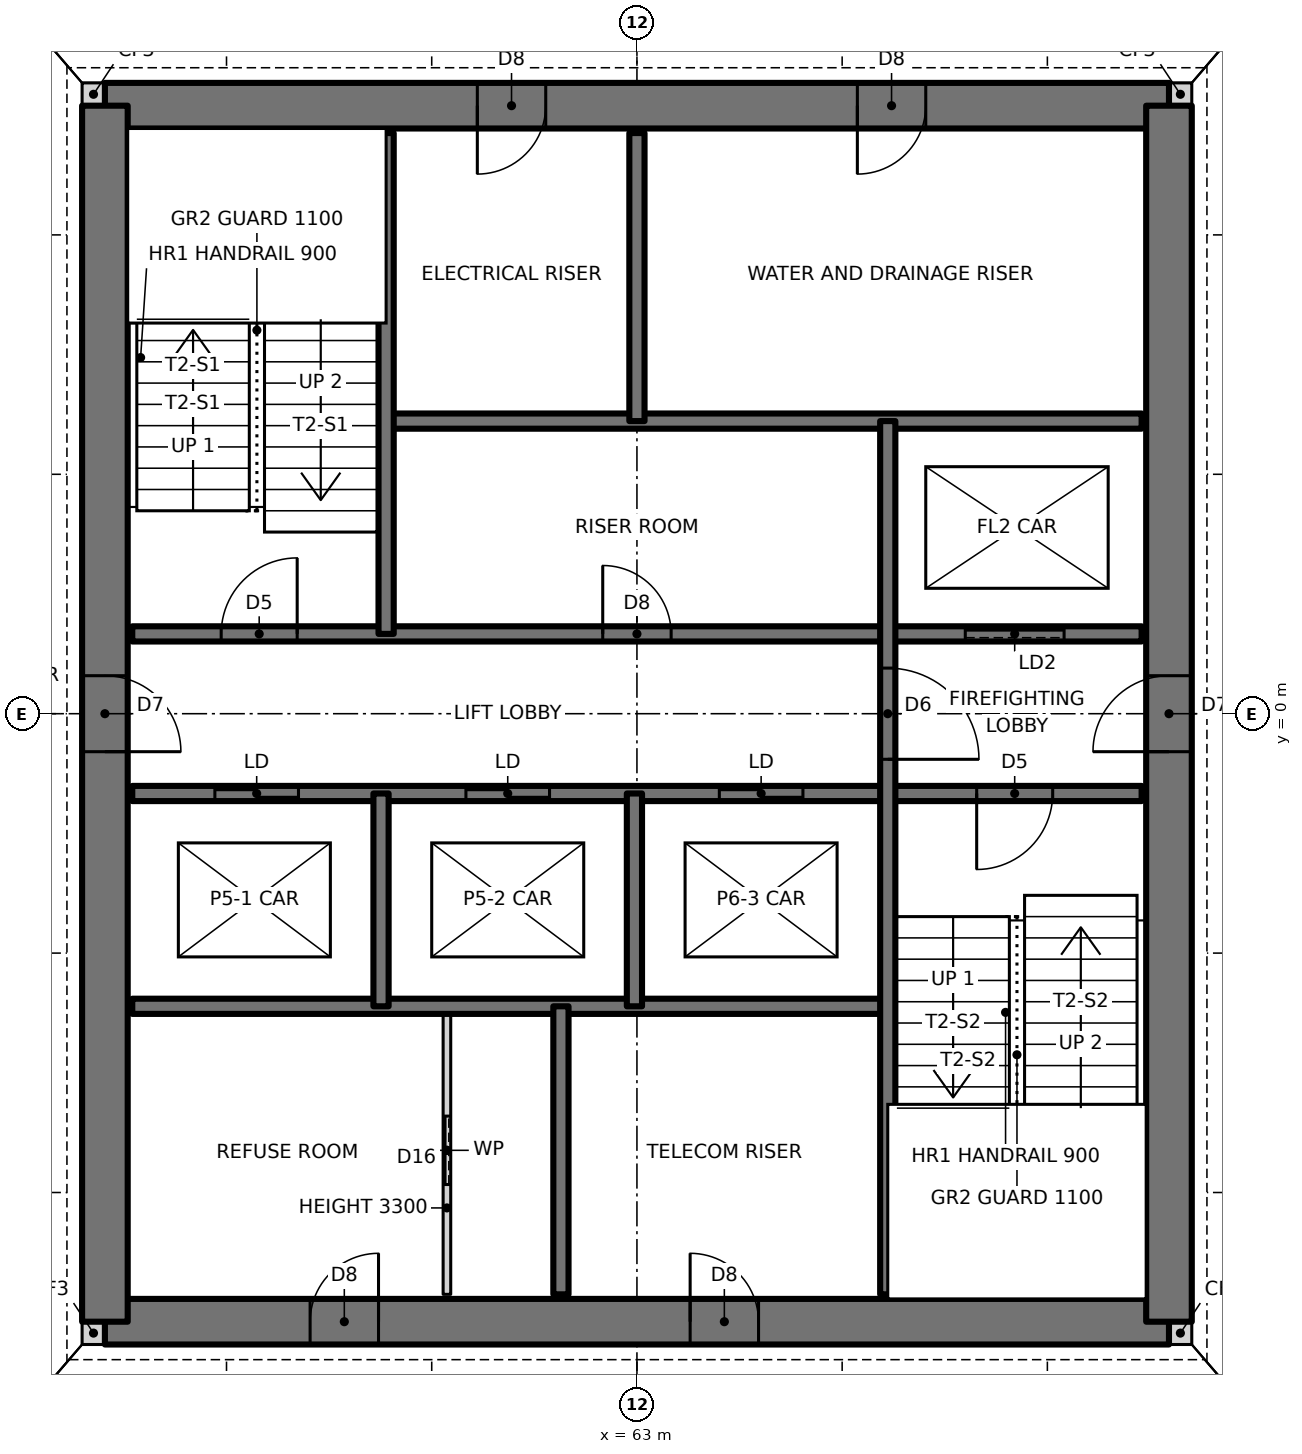
"""IFC4 building model, lengths in metres.
Left out: names, types, materials, properties, quantities, classifications, styles, units other than length and angle.
Written with IfcOpenShell. Run it as: python <this file> out.ifc"""

import sys

from ifc_helpers import new_model, si_unit, direction, frame, frame_2d, origin, place, context, subcontext, project, spatial, rectangle, extrude, element, fill, save


model = new_model("IFC4")
c1 = context("Model", 3, precision=1e-05, world=origin(), true_north=direction((0.0, 1.0)))
c2 = subcontext(c1, "Body", "Model", "MODEL_VIEW")
j1 = project(units=[si_unit("LENGTHUNIT", "METRE"), si_unit("PLANEANGLEUNIT", "RADIAN")], contexts=[c1])
p1 = place(None, origin())
s1 = spatial("IfcSite", under=j1, at=p1, CompositionType="ELEMENT")
p2 = place(p1, origin())
s2 = spatial("IfcBuilding", under=s1, at=p2, CompositionType="ELEMENT")
p3 = place(p2, frame((0.0, 0.0, 67.5)))
s3 = spatial("IfcBuildingStorey", under=s2, at=p3, CompositionType="ELEMENT", Elevation=67.5)
for number, where, z_axis, x_axis in (
    (1, (55.7, -8.15, 0.0), (0.0, 0.0, 1.0), (1.0, 0.0, 0.0)),
    (2, (70.0, -8.15, 0.0), (0.0, 0.0, 1.0), (1.0, 0.0, 0.0)),
    (3, (70.0, 8.15, 0.0), (0.0, 0.0, 1.0), (1.0, 0.0, 0.0)),
    (4, (55.7, 8.15, 0.0), (0.0, 0.0, 1.0), (1.0, 0.0, 0.0)),
):
    element("IfcWall", number, at=place(p3, frame(where, z_axis=z_axis, x_axis=x_axis)), inside=s3, PredefinedType="SOLIDWALL", context=c2, shape_type="SweptSolid", body=[
        extrude(rectangle(XDim=0.3, YDim=0.3, at=frame_2d((0.15, 0.0))), origin(), (0.0, 0.0, 1.0), 3.5),
    ])
p4 = place(p3, frame((56.0, -8.0, 0.0), z_axis=(0.0, 0.0, 1.0), x_axis=(1.0, 0.0, 0.0)))
e5 = element("IfcWall", 5, at=p4, inside=s3, PredefinedType="SHEAR", context=c2, shape_type="SweptSolid", body=[
    extrude(rectangle(XDim=14.0, YDim=0.6, at=frame_2d((7.0, 0.0))), origin(), (0.0, 0.0, 1.0), 3.5),
])
p5 = place(p4, frame((2.7, 0.0, 0.0)))
e6 = element("IfcOpeningElement", 6, at=p5, cuts=e5, PredefinedType="OPENING", context=c2, shape_type="SweptSolid", body=[
    extrude(rectangle(XDim=0.9, YDim=2.1, at=frame_2d((0.45, 1.05))), frame((0.0, 0.31, 0.0), z_axis=(0.0, -1.0, 0.0), x_axis=(1.0, 0.0, 0.0)), (0.0, 0.0, 1.0), 0.62),
])
p6 = place(p4, frame((7.7, 0.0, 0.0)))
e7 = element("IfcOpeningElement", 7, at=p6, cuts=e5, PredefinedType="OPENING", context=c2, shape_type="SweptSolid", body=[
    extrude(rectangle(XDim=0.9, YDim=2.1, at=frame_2d((0.45, 1.05))), frame((0.0, 0.31, 0.0), z_axis=(0.0, -1.0, 0.0), x_axis=(1.0, 0.0, 0.0)), (0.0, 0.0, 1.0), 0.62),
])
p7 = place(p3, frame((70.0, 8.0, 0.0), z_axis=(0.0, 0.0, 1.0), x_axis=(-1.0, 0.0, 0.0)))
e8 = element("IfcWall", 8, at=p7, inside=s3, PredefinedType="SHEAR", context=c2, shape_type="SweptSolid", body=[
    extrude(rectangle(XDim=14.0, YDim=0.6, at=frame_2d((7.0, 0.0))), origin(), (0.0, 0.0, 1.0), 3.5),
])
p8 = place(p7, frame((8.2, 0.0, 0.0)))
e9 = element("IfcOpeningElement", 9, at=p8, cuts=e8, PredefinedType="OPENING", context=c2, shape_type="SweptSolid", body=[
    extrude(rectangle(XDim=0.9, YDim=2.1, at=frame_2d((0.45, 1.05))), frame((0.0, 0.31, 0.0), z_axis=(0.0, -1.0, 0.0), x_axis=(1.0, 0.0, 0.0)), (0.0, 0.0, 1.0), 0.62),
])
p9 = place(p7, frame((3.2, 0.0, 0.0)))
e10 = element("IfcOpeningElement", 10, at=p9, cuts=e8, PredefinedType="OPENING", context=c2, shape_type="SweptSolid", body=[
    extrude(rectangle(XDim=0.9, YDim=2.1, at=frame_2d((0.45, 1.05))), frame((0.0, 0.31, 0.0), z_axis=(0.0, -1.0, 0.0), x_axis=(1.0, 0.0, 0.0)), (0.0, 0.0, 1.0), 0.62),
])
p10 = place(p3, frame((70.0, -8.0, 0.0), z_axis=(0.0, 0.0, 1.0), x_axis=(0.0, 1.0, 0.0)))
e11 = element("IfcWall", 11, at=p10, inside=s3, PredefinedType="SHEAR", context=c2, shape_type="SweptSolid", body=[
    extrude(rectangle(XDim=16.0, YDim=0.6, at=frame_2d((8.0, 0.0))), origin(), (0.0, 0.0, 1.0), 3.5),
])
p11 = place(p10, frame((7.5, 0.0, 0.0)))
e12 = element("IfcOpeningElement", 12, at=p11, cuts=e11, PredefinedType="OPENING", context=c2, shape_type="SweptSolid", body=[
    extrude(rectangle(XDim=1.0, YDim=2.1, at=frame_2d((0.5, 1.05))), frame((0.0, 0.31, 0.0), z_axis=(0.0, -1.0, 0.0), x_axis=(1.0, 0.0, 0.0)), (0.0, 0.0, 1.0), 0.62),
])
p12 = place(p3, frame((56.0, 8.0, 0.0), z_axis=(0.0, 0.0, 1.0), x_axis=(0.0, -1.0, 0.0)))
e13 = element("IfcWall", 13, at=p12, inside=s3, PredefinedType="SHEAR", context=c2, shape_type="SweptSolid", body=[
    extrude(rectangle(XDim=16.0, YDim=0.6, at=frame_2d((8.0, 0.0))), origin(), (0.0, 0.0, 1.0), 3.5),
])
p13 = place(p12, frame((7.5, 0.0, 0.0)))
e14 = element("IfcOpeningElement", 14, at=p13, cuts=e13, PredefinedType="OPENING", context=c2, shape_type="SweptSolid", body=[
    extrude(rectangle(XDim=1.0, YDim=2.1, at=frame_2d((0.5, 1.05))), frame((0.0, 0.31, 0.0), z_axis=(0.0, -1.0, 0.0), x_axis=(1.0, 0.0, 0.0)), (0.0, 0.0, 1.0), 0.62),
])
p14 = place(p3, frame((56.36, -3.85, 0.0), z_axis=(0.0, 0.0, 1.0), x_axis=(1.0, 0.0, 0.0)))
e15 = element("IfcWall", 15, at=p14, inside=s3, PredefinedType="SOLIDWALL", context=c2, shape_type="SweptSolid", body=[
    extrude(rectangle(XDim=9.94, YDim=0.2, at=frame_2d((4.97, 0.0))), origin(), (0.0, 0.0, 1.0), 3.5),
])
p15 = place(p3, frame((56.36, -1.05, 0.0), z_axis=(0.0, 0.0, 1.0), x_axis=(1.0, 0.0, 0.0)))
e16 = element("IfcWall", 16, at=p15, inside=s3, PredefinedType="SOLIDWALL", context=c2, shape_type="SweptSolid", body=[
    extrude(rectangle(XDim=13.28, YDim=0.2, at=frame_2d((6.64, 0.0))), origin(), (0.0, 0.0, 1.0), 3.5),
])
p16 = place(p15, frame((11.11, 0.0, 0.0)))
e17 = element("IfcOpeningElement", 17, at=p16, cuts=e16, PredefinedType="OPENING", context=c2, shape_type="SweptSolid", body=[
    extrude(rectangle(XDim=1.0, YDim=2.1, at=frame_2d((0.5, 1.05))), frame((0.0, 0.11, 0.0), z_axis=(0.0, -1.0, 0.0), x_axis=(1.0, 0.0, 0.0)), (0.0, 0.0, 1.0), 0.22),
])
p17 = place(p15, frame((1.087, 0.0, 0.0)))
e18 = element("IfcOpeningElement", 18, at=p17, cuts=e16, PredefinedType="OPENING", context=c2, shape_type="SweptSolid", body=[
    extrude(rectangle(XDim=1.1, YDim=2.1, at=frame_2d((0.55, 1.05))), frame((0.0, 0.11, 0.0), z_axis=(0.0, -1.0, 0.0), x_axis=(1.0, 0.0, 0.0)), (0.0, 0.0, 1.0), 0.22),
])
p18 = place(p15, frame((4.39, 0.0, 0.0)))
e19 = element("IfcOpeningElement", 19, at=p18, cuts=e16, PredefinedType="OPENING", context=c2, shape_type="SweptSolid", body=[
    extrude(rectangle(XDim=1.1, YDim=2.1, at=frame_2d((0.55, 1.05))), frame((0.0, 0.11, 0.0), z_axis=(0.0, -1.0, 0.0), x_axis=(1.0, 0.0, 0.0)), (0.0, 0.0, 1.0), 0.22),
])
p19 = place(p15, frame((7.724, 0.0, 0.0)))
e20 = element("IfcOpeningElement", 20, at=p19, cuts=e16, PredefinedType="OPENING", context=c2, shape_type="SweptSolid", body=[
    extrude(rectangle(XDim=1.1, YDim=2.1, at=frame_2d((0.55, 1.05))), frame((0.0, 0.11, 0.0), z_axis=(0.0, -1.0, 0.0), x_axis=(1.0, 0.0, 0.0)), (0.0, 0.0, 1.0), 0.22),
])
p20 = place(p3, frame((56.36, 1.05, 0.0), z_axis=(0.0, 0.0, 1.0), x_axis=(1.0, 0.0, 0.0)))
e21 = element("IfcWall", 21, at=p20, inside=s3, PredefinedType="SOLIDWALL", context=c2, shape_type="SweptSolid", body=[
    extrude(rectangle(XDim=13.28, YDim=0.2, at=frame_2d((6.64, 0.0))), origin(), (0.0, 0.0, 1.0), 3.5),
])
p21 = place(p20, frame((1.17, 0.0, 0.0)))
e22 = element("IfcOpeningElement", 22, at=p21, cuts=e21, PredefinedType="OPENING", context=c2, shape_type="SweptSolid", body=[
    extrude(rectangle(XDim=1.0, YDim=2.1, at=frame_2d((0.5, 1.05))), frame((0.0, 0.11, 0.0), z_axis=(0.0, -1.0, 0.0), x_axis=(1.0, 0.0, 0.0)), (0.0, 0.0, 1.0), 0.22),
])
p22 = place(p20, frame((6.19, 0.0, 0.0)))
e23 = element("IfcOpeningElement", 23, at=p22, cuts=e21, PredefinedType="OPENING", context=c2, shape_type="SweptSolid", body=[
    extrude(rectangle(XDim=0.9, YDim=2.1, at=frame_2d((0.45, 1.05))), frame((0.0, 0.11, 0.0), z_axis=(0.0, -1.0, 0.0), x_axis=(1.0, 0.0, 0.0)), (0.0, 0.0, 1.0), 0.22),
])
p23 = place(p20, frame((10.96, 0.0, 0.0)))
e24 = element("IfcOpeningElement", 24, at=p23, cuts=e21, PredefinedType="OPENING", context=c2, shape_type="SweptSolid", body=[
    extrude(rectangle(XDim=1.3, YDim=2.1, at=frame_2d((0.65, 1.05))), frame((0.0, 0.11, 0.0), z_axis=(0.0, -1.0, 0.0), x_axis=(1.0, 0.0, 0.0)), (0.0, 0.0, 1.0), 0.22),
])
p24 = place(p3, frame((59.7, 3.85, 0.0), z_axis=(0.0, 0.0, 1.0), x_axis=(1.0, 0.0, 0.0)))
e25 = element("IfcWall", 25, at=p24, inside=s3, PredefinedType="SOLIDWALL", context=c2, shape_type="SweptSolid", body=[
    extrude(rectangle(XDim=9.94, YDim=0.2, at=frame_2d((4.97, 0.0))), origin(), (0.0, 0.0, 1.0), 3.5),
])
p25 = place(p3, frame((66.3, -7.64, 0.0), z_axis=(0.0, 0.0, 1.0), x_axis=(0.0, 1.0, 0.0)))
e26 = element("IfcWall", 26, at=p25, inside=s3, PredefinedType="SOLIDWALL", context=c2, shape_type="SweptSolid", body=[
    extrude(rectangle(XDim=11.49, YDim=0.2, at=frame_2d((5.745, 0.0))), origin(), (0.0, 0.0, 1.0), 3.5),
])
p26 = place(p25, frame((7.04, 0.0, 0.0)))
e27 = element("IfcOpeningElement", 27, at=p26, cuts=e26, PredefinedType="OPENING", context=c2, shape_type="SweptSolid", body=[
    extrude(rectangle(XDim=1.2, YDim=2.1, at=frame_2d((0.6, 1.05))), frame((0.0, 0.11, 0.0), z_axis=(0.0, -1.0, 0.0), x_axis=(1.0, 0.0, 0.0)), (0.0, 0.0, 1.0), 0.22),
])
p27 = place(p3, frame((63.0, 3.85, 0.0), z_axis=(0.0, 0.0, 1.0), x_axis=(0.0, 1.0, 0.0)))
e28 = element("IfcWall", 28, at=p27, inside=s3, PredefinedType="SOLIDWALL", context=c2, shape_type="SweptSolid", body=[
    extrude(rectangle(XDim=3.79, YDim=0.2, at=frame_2d((1.895, 0.0))), origin(), (0.0, 0.0, 1.0), 3.5),
])
p28 = place(p3, frame((62.967, -3.85, 0.0), z_axis=(0.0, 0.0, 1.0), x_axis=(0.0, 1.0, 0.0)))
e29 = element("IfcWall", 29, at=p28, inside=s3, PredefinedType="SOLIDWALL", context=c2, shape_type="SweptSolid", body=[
    extrude(rectangle(XDim=2.8, YDim=0.2, at=frame_2d((1.4, 0.0))), origin(), (0.0, 0.0, 1.0), 3.5),
])
p29 = place(p3, frame((62.0, -7.64, 0.0), z_axis=(0.0, 0.0, 1.0), x_axis=(0.0, 1.0, 0.0)))
e30 = element("IfcWall", 30, at=p29, inside=s3, PredefinedType="SOLIDWALL", context=c2, shape_type="SweptSolid", body=[
    extrude(rectangle(XDim=3.79, YDim=0.2, at=frame_2d((1.895, 0.0))), origin(), (0.0, 0.0, 1.0), 3.5),
])
p30 = place(p3, frame((60.5, -7.64, 0.0), z_axis=(0.0, 0.0, 1.0), x_axis=(0.0, 1.0, 0.0)))
e31 = element("IfcWall", 31, at=p30, inside=s3, PredefinedType="PARTITIONING", context=c2, shape_type="SweptSolid", body=[
    extrude(rectangle(XDim=3.79, YDim=0.1, at=frame_2d((1.895, 0.0))), origin(), (0.0, 0.0, 1.0), 3.3),
])
p31 = place(p30, frame((1.445, 0.0, 0.0)))
e32 = element("IfcOpeningElement", 32, at=p31, cuts=e31, PredefinedType="OPENING", context=c2, shape_type="SweptSolid", body=[
    extrude(rectangle(XDim=0.9, YDim=2.1, at=frame_2d((0.45, 1.05))), frame((0.0, 0.06, 0.0), z_axis=(0.0, -1.0, 0.0), x_axis=(1.0, 0.0, 0.0)), (0.0, 0.0, 1.0), 0.12),
])
p32 = place(p3, frame((59.7, 1.05, 0.0), z_axis=(0.0, 0.0, 1.0), x_axis=(0.0, 1.0, 0.0)))
e33 = element("IfcWall", 33, at=p32, inside=s3, PredefinedType="SOLIDWALL", context=c2, shape_type="SweptSolid", body=[
    extrude(rectangle(XDim=6.59, YDim=0.2, at=frame_2d((3.295, 0.0))), origin(), (0.0, 0.0, 1.0), 3.5),
])
p33 = place(p3, frame((59.633, -3.85, 0.0), z_axis=(0.0, 0.0, 1.0), x_axis=(0.0, 1.0, 0.0)))
e34 = element("IfcWall", 34, at=p33, inside=s3, PredefinedType="SOLIDWALL", context=c2, shape_type="SweptSolid", body=[
    extrude(rectangle(XDim=2.8, YDim=0.2, at=frame_2d((1.4, 0.0))), origin(), (0.0, 0.0, 1.0), 3.5),
])
p34 = place(p21, origin())
e35 = element("IfcDoor", 35, at=p34, inside=s3, OperationType="SINGLE_SWING_RIGHT", PredefinedType="DOOR", context=c2, shape_type="SweptSolid", body=[
    extrude(rectangle(XDim=1.0, YDim=2.1, at=frame_2d((0.5, 1.05))), frame((0.0, 0.025, 0.0), z_axis=(0.0, -1.0, 0.0), x_axis=(1.0, 0.0, 0.0)), (0.0, 0.0, 1.0), 0.05),
])
fill(e22, e35)
p35 = place(p16, frame((1.0, 0.0, 0.0), z_axis=(0.0, 0.0, 1.0), x_axis=(-1.0, 0.0, 0.0)))
e36 = element("IfcDoor", 36, at=p35, inside=s3, OperationType="SINGLE_SWING_RIGHT", PredefinedType="DOOR", context=c2, shape_type="SweptSolid", body=[
    extrude(rectangle(XDim=1.0, YDim=2.1, at=frame_2d((0.5, 1.05))), frame((0.0, 0.025, 0.0), z_axis=(0.0, -1.0, 0.0), x_axis=(1.0, 0.0, 0.0)), (0.0, 0.0, 1.0), 0.05),
])
fill(e17, e36)
p36 = place(p26, frame((1.2, 0.0, 0.0), z_axis=(0.0, 0.0, 1.0), x_axis=(-1.0, 0.0, 0.0)))
e37 = element("IfcDoor", 37, at=p36, inside=s3, OperationType="SINGLE_SWING_RIGHT", PredefinedType="DOOR", context=c2, shape_type="SweptSolid", body=[
    extrude(rectangle(XDim=1.2, YDim=2.1, at=frame_2d((0.6, 1.05))), frame((0.0, 0.025, 0.0), z_axis=(0.0, -1.0, 0.0), x_axis=(1.0, 0.0, 0.0)), (0.0, 0.0, 1.0), 0.05),
])
fill(e27, e37)
p37 = place(p22, origin())
e38 = element("IfcDoor", 38, at=p37, inside=s3, OperationType="SINGLE_SWING_LEFT", PredefinedType="DOOR", context=c2, shape_type="SweptSolid", body=[
    extrude(rectangle(XDim=0.9, YDim=2.1, at=frame_2d((0.45, 1.05))), frame((0.0, 0.025, 0.0), z_axis=(0.0, -1.0, 0.0), x_axis=(1.0, 0.0, 0.0)), (0.0, 0.0, 1.0), 0.05),
])
fill(e23, e38)
p38 = place(p31, origin())
e39 = element("IfcDoor", 39, at=p38, inside=s3, OperationType="SLIDING_TO_LEFT", PredefinedType="DOOR", context=c2, shape_type="SweptSolid", body=[
    extrude(rectangle(XDim=0.9, YDim=2.1, at=frame_2d((0.45, 1.05))), frame((0.0, 0.025, 0.0), z_axis=(0.0, -1.0, 0.0), x_axis=(1.0, 0.0, 0.0)), (0.0, 0.0, 1.0), 0.05),
])
fill(e32, e39)
p39 = place(p13, origin())
e40 = element("IfcDoor", 40, at=p39, inside=s3, OperationType="SINGLE_SWING_RIGHT", PredefinedType="DOOR", context=c2, shape_type="SweptSolid", body=[
    extrude(rectangle(XDim=1.0, YDim=2.1, at=frame_2d((0.5, 1.05))), frame((0.0, 0.025, 0.0), z_axis=(0.0, -1.0, 0.0), x_axis=(1.0, 0.0, 0.0)), (0.0, 0.0, 1.0), 0.05),
])
fill(e14, e40)
p40 = place(p11, origin())
e41 = element("IfcDoor", 41, at=p40, inside=s3, OperationType="SINGLE_SWING_LEFT", PredefinedType="DOOR", context=c2, shape_type="SweptSolid", body=[
    extrude(rectangle(XDim=1.0, YDim=2.1, at=frame_2d((0.5, 1.05))), frame((0.0, 0.025, 0.0), z_axis=(0.0, -1.0, 0.0), x_axis=(1.0, 0.0, 0.0)), (0.0, 0.0, 1.0), 0.05),
])
fill(e12, e41)
p41 = place(p8, origin())
e42 = element("IfcDoor", 42, at=p41, inside=s3, OperationType="SINGLE_SWING_RIGHT", PredefinedType="DOOR", context=c2, shape_type="SweptSolid", body=[
    extrude(rectangle(XDim=0.9, YDim=2.1, at=frame_2d((0.45, 1.05))), frame((0.0, 0.025, 0.0), z_axis=(0.0, -1.0, 0.0), x_axis=(1.0, 0.0, 0.0)), (0.0, 0.0, 1.0), 0.05),
])
fill(e9, e42)
p42 = place(p9, origin())
e43 = element("IfcDoor", 43, at=p42, inside=s3, OperationType="SINGLE_SWING_RIGHT", PredefinedType="DOOR", context=c2, shape_type="SweptSolid", body=[
    extrude(rectangle(XDim=0.9, YDim=2.1, at=frame_2d((0.45, 1.05))), frame((0.0, 0.025, 0.0), z_axis=(0.0, -1.0, 0.0), x_axis=(1.0, 0.0, 0.0)), (0.0, 0.0, 1.0), 0.05),
])
fill(e10, e43)
p43 = place(p5, origin())
e44 = element("IfcDoor", 44, at=p43, inside=s3, OperationType="SINGLE_SWING_RIGHT", PredefinedType="DOOR", context=c2, shape_type="SweptSolid", body=[
    extrude(rectangle(XDim=0.9, YDim=2.1, at=frame_2d((0.45, 1.05))), frame((0.0, 0.025, 0.0), z_axis=(0.0, -1.0, 0.0), x_axis=(1.0, 0.0, 0.0)), (0.0, 0.0, 1.0), 0.05),
])
fill(e6, e44)
p44 = place(p6, origin())
e45 = element("IfcDoor", 45, at=p44, inside=s3, OperationType="SINGLE_SWING_LEFT", PredefinedType="DOOR", context=c2, shape_type="SweptSolid", body=[
    extrude(rectangle(XDim=0.9, YDim=2.1, at=frame_2d((0.45, 1.05))), frame((0.0, 0.025, 0.0), z_axis=(0.0, -1.0, 0.0), x_axis=(1.0, 0.0, 0.0)), (0.0, 0.0, 1.0), 0.05),
])
fill(e7, e45)
p45 = place(p17, origin())
e46 = element("IfcDoor", 46, at=p45, inside=s3, OperationType="DOUBLE_DOOR_SLIDING", PredefinedType="DOOR", context=c2, shape_type="SweptSolid", body=[
    extrude(rectangle(XDim=1.1, YDim=2.1, at=frame_2d((0.55, 1.05))), frame((0.0, 0.025, 0.0), z_axis=(0.0, -1.0, 0.0), x_axis=(1.0, 0.0, 0.0)), (0.0, 0.0, 1.0), 0.05),
])
fill(e18, e46)
p46 = place(p18, origin())
e47 = element("IfcDoor", 47, at=p46, inside=s3, OperationType="DOUBLE_DOOR_SLIDING", PredefinedType="DOOR", context=c2, shape_type="SweptSolid", body=[
    extrude(rectangle(XDim=1.1, YDim=2.1, at=frame_2d((0.55, 1.05))), frame((0.0, 0.025, 0.0), z_axis=(0.0, -1.0, 0.0), x_axis=(1.0, 0.0, 0.0)), (0.0, 0.0, 1.0), 0.05),
])
fill(e19, e47)
p47 = place(p19, origin())
e48 = element("IfcDoor", 48, at=p47, inside=s3, OperationType="DOUBLE_DOOR_SLIDING", PredefinedType="DOOR", context=c2, shape_type="SweptSolid", body=[
    extrude(rectangle(XDim=1.1, YDim=2.1, at=frame_2d((0.55, 1.05))), frame((0.0, 0.025, 0.0), z_axis=(0.0, -1.0, 0.0), x_axis=(1.0, 0.0, 0.0)), (0.0, 0.0, 1.0), 0.05),
])
fill(e20, e48)
p48 = place(p23, origin())
e49 = element("IfcDoor", 49, at=p48, inside=s3, OperationType="SLIDING_TO_LEFT", PredefinedType="DOOR", context=c2, shape_type="SweptSolid", body=[
    extrude(rectangle(XDim=1.3, YDim=2.1, at=frame_2d((0.65, 1.05))), frame((0.0, 0.025, 0.0), z_axis=(0.0, -1.0, 0.0), x_axis=(1.0, 0.0, 0.0)), (0.0, 0.0, 1.0), 0.05),
])
fill(e24, e49)
save(model, sys.argv[1])
